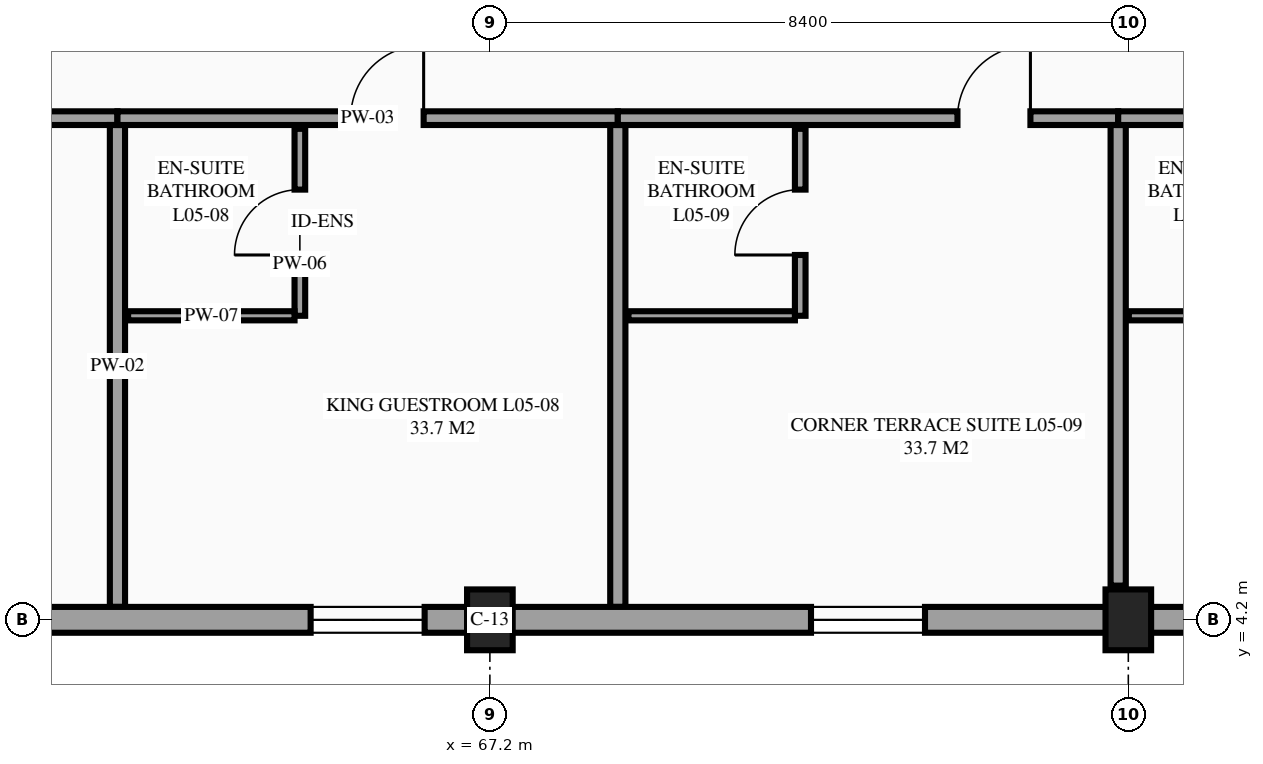
"""IFC4 building model, lengths in metres.
Left out: names, types, materials, properties, quantities, classifications, styles, units other than length and angle.
Written with IfcOpenShell. Run it as: python <this file> out.ifc"""

import sys

from ifc_helpers import new_model, si_unit, direction, frame, frame_2d, origin, origin_2d, place, context, subcontext, project, spatial, rectangle, extrude, element, fill, save


model = new_model("IFC4")
c1 = context("Model", 3, precision=1e-05, world=origin(), true_north=direction((0.0, 1.0)))
c2 = subcontext(c1, "Body", "Model", "MODEL_VIEW")
j1 = project(units=[si_unit("LENGTHUNIT", "METRE"), si_unit("PLANEANGLEUNIT", "RADIAN")], contexts=[c1])
p1 = place(None, origin())
s1 = spatial("IfcSite", under=j1, at=p1, CompositionType="ELEMENT")
p2 = place(p1, origin())
s2 = spatial("IfcBuilding", under=s1, at=p2, CompositionType="ELEMENT")
p3 = place(p2, frame((0.0, 0.0, 21.9)))
s3 = spatial("IfcBuildingStorey", under=s2, at=p3, CompositionType="ELEMENT", Elevation=21.9)
for number, where, z_axis, x_axis in (
    (1, (67.2, 4.2, 0.0), (0.0, 0.0, 1.0), (1.0, 0.0, 0.0)),
    (2, (75.6, 4.2, 0.0), (0.0, 0.0, 1.0), (1.0, 0.0, 0.0)),
):
    element("IfcColumn", number, at=place(p3, frame(where, z_axis=z_axis, x_axis=x_axis)), inside=s3, PredefinedType="COLUMN", context=c2, shape_type="SweptSolid", body=[
        extrude(rectangle(XDim=0.6, YDim=0.8, at=origin_2d()), origin(), (0.0, 0.0, 1.0), 3.6),
    ])
p4 = place(p3, frame((55.717, 10.8, 0.0), z_axis=(0.0, 0.0, 1.0), x_axis=(1.0, 0.0, 0.0)))
e3 = element("IfcWall", 3, at=p4, inside=s3, PredefinedType="PARTITIONING", context=c2, shape_type="SweptSolid", body=[
    extrude(rectangle(XDim=6.583, YDim=0.18, at=frame_2d((3.292, 0.0))), origin(), (0.0, 0.0, 1.0), 3.375),
])
p5 = place(p4, frame((4.469, 0.0, 0.0)))
e4 = element("IfcOpeningElement", 4, at=p5, cuts=e3, PredefinedType="OPENING", context=c2, shape_type="SweptSolid", body=[
    extrude(rectangle(XDim=0.96, YDim=2.15, at=frame_2d((0.48, 1.075))), frame((0.0, 0.1, 0.0), z_axis=(0.0, -1.0, 0.0), x_axis=(1.0, 0.0, 0.0)), (0.0, 0.0, 1.0), 0.2),
])
p6 = place(p3, frame((62.3, 4.37, 0.0), z_axis=(0.0, 0.0, 1.0), x_axis=(0.0, 1.0, 0.0)))
e5 = element("IfcWall", 5, at=p6, inside=s3, PredefinedType="PARTITIONING", context=c2, shape_type="SweptSolid", body=[
    extrude(rectangle(XDim=6.34, YDim=0.2, at=frame_2d((3.17, 0.0))), origin(), (0.0, 0.0, 1.0), 3.375),
])
p7 = place(p3, frame((62.3, 10.8, 0.0), z_axis=(0.0, 0.0, 1.0), x_axis=(1.0, 0.0, 0.0)))
e6 = element("IfcWall", 6, at=p7, inside=s3, PredefinedType="PARTITIONING", context=c2, shape_type="SweptSolid", body=[
    extrude(rectangle(XDim=6.583, YDim=0.18, at=frame_2d((3.292, 0.0))), origin(), (0.0, 0.0, 1.0), 3.375),
])
p8 = place(p7, frame((3.069, 0.0, 0.0)))
e7 = element("IfcOpeningElement", 7, at=p8, cuts=e6, PredefinedType="OPENING", context=c2, shape_type="SweptSolid", body=[
    extrude(rectangle(XDim=0.96, YDim=2.15, at=frame_2d((0.48, 1.075))), frame((0.0, 0.1, 0.0), z_axis=(0.0, -1.0, 0.0), x_axis=(1.0, 0.0, 0.0)), (0.0, 0.0, 1.0), 0.2),
])
p9 = place(p3, frame((68.883, 4.37, 0.0), z_axis=(0.0, 0.0, 1.0), x_axis=(0.0, 1.0, 0.0)))
e8 = element("IfcWall", 8, at=p9, inside=s3, PredefinedType="PARTITIONING", context=c2, shape_type="SweptSolid", body=[
    extrude(rectangle(XDim=6.34, YDim=0.2, at=frame_2d((3.17, 0.0))), origin(), (0.0, 0.0, 1.0), 3.375),
])
p10 = place(p3, frame((64.7, 8.2, 0.0), z_axis=(0.0, 0.0, 1.0), x_axis=(0.0, 1.0, 0.0)))
e9 = element("IfcWall", 9, at=p10, inside=s3, PredefinedType="PARTITIONING", context=c2, shape_type="SweptSolid", body=[
    extrude(rectangle(XDim=2.46, YDim=0.14, at=frame_2d((1.23, 0.0))), origin(), (0.0, 0.0, 1.0), 3.375),
])
p11 = place(p10, frame((0.8, 0.0, 0.0)))
e10 = element("IfcOpeningElement", 10, at=p11, cuts=e9, PredefinedType="OPENING", context=c2, shape_type="SweptSolid", body=[
    extrude(rectangle(XDim=0.86, YDim=2.1, at=frame_2d((0.43, 1.05))), frame((0.0, 0.08, 0.0), z_axis=(0.0, -1.0, 0.0), x_axis=(1.0, 0.0, 0.0)), (0.0, 0.0, 1.0), 0.16),
])
p12 = place(p3, frame((62.44, 8.2, 0.0), z_axis=(0.0, 0.0, 1.0), x_axis=(1.0, 0.0, 0.0)))
e11 = element("IfcWall", 11, at=p12, inside=s3, PredefinedType="PARTITIONING", context=c2, shape_type="SweptSolid", body=[
    extrude(rectangle(XDim=2.19, YDim=0.12, at=frame_2d((1.095, 0.0))), origin(), (0.0, 0.0, 1.0), 3.375),
])
p13 = place(p3, frame((68.883, 10.8, 0.0), z_axis=(0.0, 0.0, 1.0), x_axis=(1.0, 0.0, 0.0)))
e12 = element("IfcWall", 12, at=p13, inside=s3, PredefinedType="PARTITIONING", context=c2, shape_type="SweptSolid", body=[
    extrude(rectangle(XDim=6.583, YDim=0.18, at=frame_2d((3.292, 0.0))), origin(), (0.0, 0.0, 1.0), 3.375),
])
p14 = place(p13, frame((4.469, 0.0, 0.0)))
e13 = element("IfcOpeningElement", 13, at=p14, cuts=e12, PredefinedType="OPENING", context=c2, shape_type="SweptSolid", body=[
    extrude(rectangle(XDim=0.96, YDim=2.15, at=frame_2d((0.48, 1.075))), frame((0.0, 0.1, 0.0), z_axis=(0.0, -1.0, 0.0), x_axis=(1.0, 0.0, 0.0)), (0.0, 0.0, 1.0), 0.2),
])
p15 = place(p3, frame((75.467, 4.65, 0.0), z_axis=(0.0, 0.0, 1.0), x_axis=(0.0, 1.0, 0.0)))
e14 = element("IfcWall", 14, at=p15, inside=s3, PredefinedType="PARTITIONING", context=c2, shape_type="SweptSolid", body=[
    extrude(rectangle(XDim=6.06, YDim=0.2, at=frame_2d((3.03, 0.0))), origin(), (0.0, 0.0, 1.0), 2.78),
])
p16 = place(p3, frame((71.283, 8.2, 0.0), z_axis=(0.0, 0.0, 1.0), x_axis=(0.0, 1.0, 0.0)))
e15 = element("IfcWall", 15, at=p16, inside=s3, PredefinedType="PARTITIONING", context=c2, shape_type="SweptSolid", body=[
    extrude(rectangle(XDim=2.46, YDim=0.14, at=frame_2d((1.23, 0.0))), origin(), (0.0, 0.0, 1.0), 3.375),
])
p17 = place(p16, frame((0.8, 0.0, 0.0)))
e16 = element("IfcOpeningElement", 16, at=p17, cuts=e15, PredefinedType="OPENING", context=c2, shape_type="SweptSolid", body=[
    extrude(rectangle(XDim=0.86, YDim=2.1, at=frame_2d((0.43, 1.05))), frame((0.0, 0.08, 0.0), z_axis=(0.0, -1.0, 0.0), x_axis=(1.0, 0.0, 0.0)), (0.0, 0.0, 1.0), 0.16),
])
p18 = place(p3, frame((69.023, 8.2, 0.0), z_axis=(0.0, 0.0, 1.0), x_axis=(1.0, 0.0, 0.0)))
e17 = element("IfcWall", 17, at=p18, inside=s3, PredefinedType="PARTITIONING", context=c2, shape_type="SweptSolid", body=[
    extrude(rectangle(XDim=2.19, YDim=0.12, at=frame_2d((1.095, 0.0))), origin(), (0.0, 0.0, 1.0), 3.375),
])
p19 = place(p3, frame((75.467, 10.8, 0.0), z_axis=(0.0, 0.0, 1.0), x_axis=(1.0, 0.0, 0.0)))
e18 = element("IfcWall", 18, at=p19, inside=s3, PredefinedType="PARTITIONING", context=c2, shape_type="SweptSolid", body=[
    extrude(rectangle(XDim=6.583, YDim=0.18, at=frame_2d((3.292, 0.0))), origin(), (0.0, 0.0, 1.0), 3.375),
])
p20 = place(p19, frame((4.469, 0.0, 0.0)))
e19 = element("IfcOpeningElement", 19, at=p20, cuts=e18, PredefinedType="OPENING", context=c2, shape_type="SweptSolid", body=[
    extrude(rectangle(XDim=0.96, YDim=2.15, at=frame_2d((0.48, 1.075))), frame((0.0, 0.1, 0.0), z_axis=(0.0, -1.0, 0.0), x_axis=(1.0, 0.0, 0.0)), (0.0, 0.0, 1.0), 0.2),
])
p21 = place(p3, frame((75.607, 8.2, 0.0), z_axis=(0.0, 0.0, 1.0), x_axis=(1.0, 0.0, 0.0)))
e20 = element("IfcWall", 20, at=p21, inside=s3, PredefinedType="PARTITIONING", context=c2, shape_type="SweptSolid", body=[
    extrude(rectangle(XDim=2.19, YDim=0.12, at=frame_2d((1.095, 0.0))), origin(), (0.0, 0.0, 1.0), 3.375),
])
p22 = place(p3, frame((58.8, 4.2, 0.0), z_axis=(0.0, 0.0, 1.0), x_axis=(1.0, 0.0, 0.0)))
e21 = element("IfcWall", 21, at=p22, inside=s3, PredefinedType="STANDARD", context=c2, shape_type="SweptSolid", body=[
    extrude(rectangle(XDim=8.4, YDim=0.34, at=frame_2d((4.2, 0.0))), origin(), (0.0, 0.0, 1.0), 3.07),
])
p23 = place(p22, frame((0.708, 0.0, 0.85)))
e22 = element("IfcOpeningElement", 22, at=p23, cuts=e21, PredefinedType="OPENING", context=c2, shape_type="SweptSolid", body=[
    extrude(rectangle(XDim=1.5, YDim=1.5, at=frame_2d((0.75, 0.75))), frame((0.0, 0.18, 0.0), z_axis=(0.0, -1.0, 0.0), x_axis=(1.0, 0.0, 0.0)), (0.0, 0.0, 1.0), 0.36),
])
p24 = place(p22, frame((6.042, 0.0, 0.85)))
e23 = element("IfcOpeningElement", 23, at=p24, cuts=e21, PredefinedType="OPENING", context=c2, shape_type="SweptSolid", body=[
    extrude(rectangle(XDim=1.5, YDim=1.5, at=frame_2d((0.75, 0.75))), frame((0.0, 0.18, 0.0), z_axis=(0.0, -1.0, 0.0), x_axis=(1.0, 0.0, 0.0)), (0.0, 0.0, 1.0), 0.36),
])
p25 = place(p3, frame((67.2, 4.2, 0.0), z_axis=(0.0, 0.0, 1.0), x_axis=(1.0, 0.0, 0.0)))
e24 = element("IfcWall", 24, at=p25, inside=s3, PredefinedType="STANDARD", context=c2, shape_type="SweptSolid", body=[
    extrude(rectangle(XDim=8.4, YDim=0.34, at=frame_2d((4.2, 0.0))), origin(), (0.0, 0.0, 1.0), 2.48),
])
p26 = place(p25, frame((4.225, 0.0, 0.85)))
e25 = element("IfcOpeningElement", 25, at=p26, cuts=e24, PredefinedType="OPENING", context=c2, shape_type="SweptSolid", body=[
    extrude(rectangle(XDim=1.5, YDim=1.5, at=frame_2d((0.75, 0.75))), frame((0.0, 0.18, 0.0), z_axis=(0.0, -1.0, 0.0), x_axis=(1.0, 0.0, 0.0)), (0.0, 0.0, 1.0), 0.36),
])
p27 = place(p3, frame((75.6, 4.2, 0.0), z_axis=(0.0, 0.0, 1.0), x_axis=(1.0, 0.0, 0.0)))
e26 = element("IfcWall", 26, at=p27, inside=s3, PredefinedType="STANDARD", context=c2, shape_type="SweptSolid", body=[
    extrude(rectangle(XDim=8.4, YDim=0.34, at=frame_2d((4.2, 0.0))), origin(), (0.0, 0.0, 1.0), 2.58),
])
p28 = place(p27, frame((2.408, 0.0, 0.85)))
e27 = element("IfcOpeningElement", 27, at=p28, cuts=e26, PredefinedType="OPENING", context=c2, shape_type="SweptSolid", body=[
    extrude(rectangle(XDim=1.5, YDim=1.5, at=frame_2d((0.75, 0.75))), frame((0.0, 0.18, 0.0), z_axis=(0.0, -1.0, 0.0), x_axis=(1.0, 0.0, 0.0)), (0.0, 0.0, 1.0), 0.36),
])
p29 = place(p24, origin())
e28 = element("IfcWindow", 28, at=p29, inside=s3, PartitioningType="SINGLE_PANEL", PredefinedType="WINDOW", context=c2, shape_type="SweptSolid", body=[
    extrude(rectangle(XDim=1.5, YDim=1.5, at=frame_2d((0.75, 0.75))), frame((0.0, 0.03, 0.0), z_axis=(0.0, -1.0, 0.0), x_axis=(1.0, 0.0, 0.0)), (0.0, 0.0, 1.0), 0.06),
])
fill(e23, e28)
p30 = place(p26, origin())
e29 = element("IfcWindow", 29, at=p30, inside=s3, PartitioningType="SINGLE_PANEL", PredefinedType="WINDOW", context=c2, shape_type="SweptSolid", body=[
    extrude(rectangle(XDim=1.5, YDim=1.5, at=frame_2d((0.75, 0.75))), frame((0.0, 0.03, 0.0), z_axis=(0.0, -1.0, 0.0), x_axis=(1.0, 0.0, 0.0)), (0.0, 0.0, 1.0), 0.06),
])
fill(e25, e29)
p31 = place(p8, origin())
e30 = element("IfcDoor", 30, at=p31, inside=s3, OperationType="SINGLE_SWING_RIGHT", PredefinedType="DOOR", context=c2, shape_type="SweptSolid", body=[
    extrude(rectangle(XDim=0.96, YDim=2.15, at=frame_2d((0.48, 1.075))), frame((0.0, 0.025, 0.0), z_axis=(0.0, -1.0, 0.0), x_axis=(1.0, 0.0, 0.0)), (0.0, 0.0, 1.0), 0.05),
])
fill(e7, e30)
p32 = place(p11, origin())
e31 = element("IfcDoor", 31, at=p32, inside=s3, OperationType="SINGLE_SWING_LEFT", PredefinedType="DOOR", context=c2, shape_type="SweptSolid", body=[
    extrude(rectangle(XDim=0.86, YDim=2.1, at=frame_2d((0.43, 1.05))), frame((0.0, 0.025, 0.0), z_axis=(0.0, -1.0, 0.0), x_axis=(1.0, 0.0, 0.0)), (0.0, 0.0, 1.0), 0.05),
])
fill(e10, e31)
p33 = place(p14, origin())
e32 = element("IfcDoor", 32, at=p33, inside=s3, OperationType="SINGLE_SWING_RIGHT", PredefinedType="DOOR", context=c2, shape_type="SweptSolid", body=[
    extrude(rectangle(XDim=0.96, YDim=2.15, at=frame_2d((0.48, 1.075))), frame((0.0, 0.025, 0.0), z_axis=(0.0, -1.0, 0.0), x_axis=(1.0, 0.0, 0.0)), (0.0, 0.0, 1.0), 0.05),
])
fill(e13, e32)
p34 = place(p17, origin())
e33 = element("IfcDoor", 33, at=p34, inside=s3, OperationType="SINGLE_SWING_LEFT", PredefinedType="DOOR", context=c2, shape_type="SweptSolid", body=[
    extrude(rectangle(XDim=0.86, YDim=2.1, at=frame_2d((0.43, 1.05))), frame((0.0, 0.025, 0.0), z_axis=(0.0, -1.0, 0.0), x_axis=(1.0, 0.0, 0.0)), (0.0, 0.0, 1.0), 0.05),
])
fill(e16, e33)
save(model, sys.argv[1])
